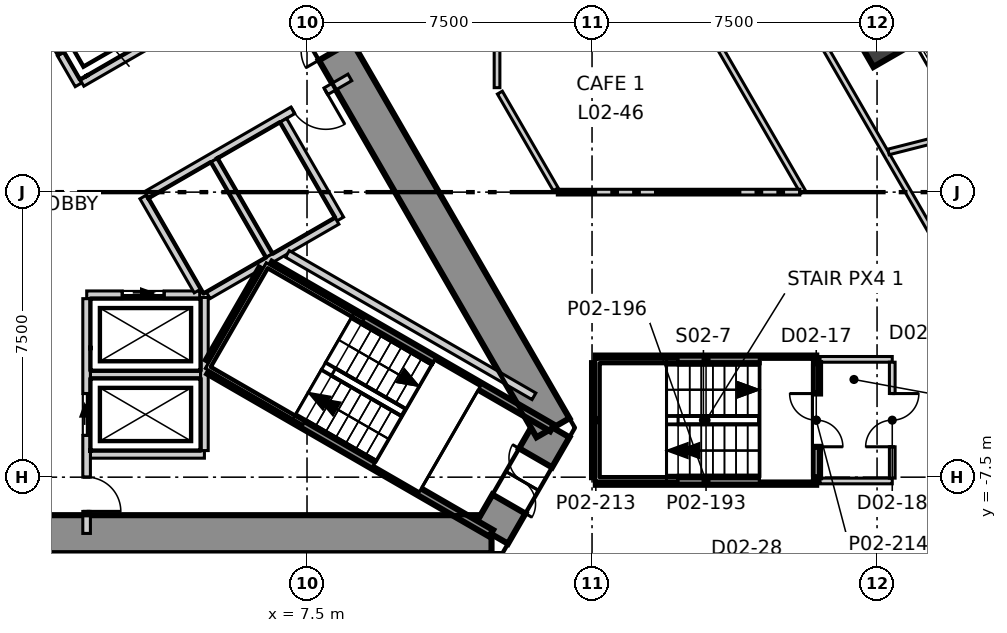
"""IFC4 building model, lengths in metres.
Left out: names, types, materials, properties, quantities, classifications, styles, units other than length and angle.
Written with IfcOpenShell. Run it as: python <this file> out.ifc"""

import sys

from ifc_helpers import new_model, si_unit, direction, frame, frame_2d, origin, origin_2d, place, context, subcontext, project, spatial, polyline, rectangle, outline, extrude, element, fill, save


model = new_model("IFC4")
c1 = context("Model", 3, precision=1e-05, world=origin(), true_north=direction((0.0, 1.0)))
c2 = subcontext(c1, "Body", "Model", "MODEL_VIEW")
j1 = project(units=[si_unit("LENGTHUNIT", "METRE"), si_unit("PLANEANGLEUNIT", "RADIAN")], contexts=[c1])
p1 = place(None, origin())
s1 = spatial("IfcSite", under=j1, at=p1, CompositionType="ELEMENT")
p2 = place(p1, origin())
s2 = spatial("IfcBuilding", under=s1, at=p2, CompositionType="ELEMENT")
p3 = place(p2, frame((0.0, 0.0, 14.5)))
s3 = spatial("IfcBuildingStorey", under=s2, at=p3, CompositionType="ELEMENT", Elevation=14.5)
p4 = place(p3, frame((-12.355, -9.0, -0.4), z_axis=(0.0, 0.0, 1.0), x_axis=(1.0, 0.0, 0.0)))
e1 = element("IfcWall", 1, at=p4, inside=s3, PredefinedType="SHEAR", context=c2, shape_type="SweptSolid", body=[
    extrude(outline(polyline([(-0.289, -0.5), (1.656, -0.5), (3.601, -0.5), (5.547, -0.5), (7.492, -0.5), (9.437, -0.5), (11.382, -0.5), (13.328, -0.5), (15.273, -0.5), (17.218, -0.5), (19.163, -0.5), (21.109, -0.5), (23.054, -0.5), (24.999, -0.5), (24.422, 0.5), (22.566, 0.5), (20.709, 0.5), (18.853, 0.5), (16.996, 0.5), (15.14, 0.5), (13.283, 0.5), (11.427, 0.5), (9.57, 0.5), (7.714, 0.5), (5.857, 0.5), (4.001, 0.5), (2.145, 0.5), (0.288, 0.5), (-0.289, -0.5)])), origin(), (0.0, 0.0, 1.0), 5.4),
])
p5 = place(p3, frame((12.355, -9.0, -0.4), z_axis=(0.0, 0.0, 1.0), x_axis=(0.500077567175, 0.865980615723, 0.0)))
e2 = element("IfcWall", 2, at=p5, inside=s3, PredefinedType="SHEAR", context=c2, shape_type="SweptSolid", body=[
    extrude(outline(polyline([(-0.288, -0.5), (1.617, -0.5), (3.522, -0.5), (2.945, 0.5), (1.617, 0.5), (0.289, 0.499), (-0.288, -0.5)])), origin(), (0.0, 0.0, 1.0), 5.4),
])
p6 = place(p5, frame((0.917, 0.0, 0.4)))
e3 = element("IfcOpeningElement", 3, at=p6, cuts=e2, PredefinedType="OPENING", context=c2, shape_type="SweptSolid", body=[
    extrude(rectangle(XDim=1.4, YDim=2.1, at=frame_2d((0.7, 1.05))), frame((0.0, 0.51, 0.0), z_axis=(0.0, -1.0, 0.0), x_axis=(1.0, 0.0, 0.0)), (0.0, 0.0, 1.0), 1.02),
])
p7 = place(p3, frame((13.972, -6.2, -0.4), z_axis=(0.0, 0.0, 1.0), x_axis=(-0.499992141631, 0.866029940768, 0.0)))
e4 = element("IfcWall", 4, at=p7, inside=s3, PredefinedType="SHEAR", context=c2, shape_type="SweptSolid", body=[
    extrude(outline(polyline([(-0.288, -0.5), (1.657, -0.5), (3.602, -0.5), (5.547, -0.5), (7.493, -0.5), (9.438, -0.5), (11.383, -0.5), (13.328, -0.5), (15.273, -0.5), (17.218, -0.499), (19.164, -0.499), (21.109, -0.499), (23.054, -0.499), (24.999, -0.499), (24.422, 0.5), (22.566, 0.5), (20.709, 0.5), (18.853, 0.5), (16.996, 0.5), (15.14, 0.5), (13.283, 0.5), (11.427, 0.5), (9.57, 0.5), (7.714, 0.5), (5.857, 0.5), (4.001, 0.5), (2.145, 0.5), (0.288, 0.5), (-0.288, -0.5)])), origin(), (0.0, 0.0, 1.0), 5.4),
])
p8 = place(p7, frame((11.455, 0.0, 0.4)))
e5 = element("IfcOpeningElement", 5, at=p8, cuts=e4, PredefinedType="OPENING", context=c2, shape_type="SweptSolid", body=[
    extrude(rectangle(XDim=1.8, YDim=2.1, at=frame_2d((0.9, 1.05))), frame((0.0, 0.51, 0.0), z_axis=(0.0, -1.0, 0.0), x_axis=(1.0, 0.0, 0.0)), (0.0, 0.0, 1.0), 1.02),
])
p9 = place(p3, frame((22.506, 4.219, -0.4), z_axis=(0.0, 0.0, 1.0), x_axis=(-0.5, 0.866025403784, 0.0)))
e6 = element("IfcColumn", 6, at=p9, inside=s3, PredefinedType="COLUMN", context=c2, shape_type="SweptSolid", body=[
    extrude(rectangle(XDim=1.5, YDim=1.1, at=origin_2d()), origin(), (0.0, 0.0, 1.0), 5.4),
])
for number, where, z_axis, x_axis in (
    (7, (21.0, -7.6, 0.0), (0.0, 0.0, 1.0), (1.0, 0.0, 0.0)),
    (8, (21.0, -4.4, 0.0), (0.0, 0.0, 1.0), (1.0, 0.0, 0.0)),
):
    element("IfcWall", number, at=place(p3, frame(where, z_axis=z_axis, x_axis=x_axis)), inside=s3, PredefinedType="PARTITIONING", context=c2, shape_type="SweptSolid", body=[
        extrude(rectangle(XDim=1.9, YDim=0.15, at=frame_2d((0.95, 0.0))), origin(), (0.0, 0.0, 1.0), 5.0),
    ])
p10 = place(p3, frame((22.9, -7.525, 0.0), z_axis=(0.0, 0.0, 1.0), x_axis=(0.0, 1.0, 0.0)))
e9 = element("IfcWall", 9, at=p10, inside=s3, PredefinedType="PARTITIONING", context=c2, shape_type="SweptSolid", body=[
    extrude(rectangle(XDim=3.05, YDim=0.15, at=frame_2d((1.525, 0.0))), origin(), (0.0, 0.0, 1.0), 5.0),
])
p11 = place(p10, frame((0.825, 0.0, 0.0)))
e10 = element("IfcOpeningElement", 10, at=p11, cuts=e9, PredefinedType="OPENING", context=c2, shape_type="SweptSolid", body=[
    extrude(rectangle(XDim=1.4, YDim=2.1, at=frame_2d((0.7, 1.05))), frame((0.0, 0.085, 0.0), z_axis=(0.0, -1.0, 0.0), x_axis=(1.0, 0.0, 0.0)), (0.0, 0.0, 1.0), 0.17),
])
p12 = place(p3, frame((16.166, 12.4, 0.0), z_axis=(0.0, 0.0, 1.0), x_axis=(0.499977560568, -0.866038358809, 0.0)))
e11 = element("IfcWall", 11, at=p12, inside=s3, PredefinedType="PARTITIONING", context=c2, shape_type="SweptSolid", body=[
    extrude(rectangle(XDim=16.541, YDim=0.15, at=frame_2d((8.271, 0.0))), origin(), (0.0, 0.0, 1.0), 5.0),
])
p13 = place(p12, frame((7.261, 0.0, 0.0)))
e12 = element("IfcOpeningElement", 12, at=p13, cuts=e11, PredefinedType="OPENING", context=c2, shape_type="SweptSolid", body=[
    extrude(rectangle(XDim=1.0, YDim=2.1, at=frame_2d((0.5, 1.05))), frame((0.0, 0.085, 0.0), z_axis=(0.0, -1.0, 0.0), x_axis=(1.0, 0.0, 0.0)), (0.0, 0.0, 1.0), 0.17),
])
p14 = place(p3, frame((22.801, 1.057, 0.0), z_axis=(0.0, 0.0, 1.0), x_axis=(0.969152417799, 0.246462149375, 0.0)))
e13 = element("IfcWall", 13, at=p14, inside=s3, PredefinedType="PARTITIONING", context=c2, shape_type="SweptSolid", body=[
    extrude(rectangle(XDim=2.208, YDim=0.15, at=frame_2d((1.104, 0.0))), origin(), (0.0, 0.0, 1.0), 5.0),
])
p15 = place(p3, frame((14.78, 10.0, 0.0), z_axis=(0.0, 0.0, 1.0), x_axis=(0.500027479704, -0.866009537788, 0.0)))
e14 = element("IfcWall", 14, at=p15, inside=s3, PredefinedType="PARTITIONING", context=c2, shape_type="SweptSolid", body=[
    extrude(rectangle(XDim=11.547, YDim=0.15, at=frame_2d((5.773, 0.0))), origin(), (0.0, 0.0, 1.0), 5.0),
])
p16 = place(p15, frame((4.874, 0.0, 0.0)))
e15 = element("IfcOpeningElement", 15, at=p16, cuts=e14, PredefinedType="OPENING", context=c2, shape_type="SweptSolid", body=[
    extrude(rectangle(XDim=1.8, YDim=2.1, at=frame_2d((0.9, 1.05))), frame((0.0, 0.085, 0.0), z_axis=(0.0, -1.0, 0.0), x_axis=(1.0, 0.0, 0.0)), (0.0, 0.0, 1.0), 0.17),
])
p17 = place(p3, frame((12.5, 2.749, 0.0), z_axis=(0.0, 0.0, 1.0), x_axis=(0.0, 1.0, 0.0)))
e16 = element("IfcWall", 16, at=p17, inside=s3, PredefinedType="PARTITIONING", context=c2, shape_type="SweptSolid", body=[
    extrude(rectangle(XDim=7.251, YDim=0.15, at=frame_2d((3.625, 0.0))), origin(), (0.0, 0.0, 1.0), 5.0),
])
p18 = place(p3, frame((14.087, 0.0, 0.0), z_axis=(0.0, 0.0, 1.0), x_axis=(1.0, 0.0, 0.0)))
e17 = element("IfcWall", 17, at=p18, inside=s3, PredefinedType="PARTITIONING", context=c2, shape_type="SweptSolid", body=[
    extrude(rectangle(XDim=6.38, YDim=0.15, at=frame_2d((3.19, 0.0))), origin(), (0.0, 0.0, 1.0), 5.0),
])
p19 = place(p3, frame((12.575, 2.619, 0.0), z_axis=(0.0, 0.0, 1.0), x_axis=(0.500062965414, -0.865989047634, 0.0)))
e18 = element("IfcWall", 18, at=p19, inside=s3, PredefinedType="PARTITIONING", context=c2, shape_type="SweptSolid", body=[
    extrude(rectangle(XDim=2.938, YDim=0.15, at=frame_2d((1.469, 0.0))), origin(), (0.0, 0.0, 1.0), 5.0),
])
p20 = place(p3, frame((1.8, -4.8, 0.0), z_axis=(0.0, 0.0, 1.0), x_axis=(1.0, 0.0, 0.0)))
e19 = element("IfcWall", 19, at=p20, inside=s3, PredefinedType="SOLIDWALL", context=c2, shape_type="SweptSolid", body=[
    extrude(rectangle(XDim=2.9, YDim=0.2, at=frame_2d((1.45, 0.0))), origin(), (0.0, 0.0, 1.0), 5.0),
])
p21 = place(p3, frame((1.8, -6.9, 0.0), z_axis=(0.0, 0.0, 1.0), x_axis=(1.0, 0.0, 0.0)))
e20 = element("IfcWall", 20, at=p21, inside=s3, PredefinedType="SOLIDWALL", context=c2, shape_type="SweptSolid", body=[
    extrude(rectangle(XDim=3.0, YDim=0.2, at=frame_2d((1.5, 0.0))), origin(), (0.0, 0.0, 1.0), 5.0),
])
p22 = place(p3, frame((1.703, -2.7, 0.0), z_axis=(0.0, 0.0, 1.0), x_axis=(1.0, 0.0, 0.0)))
e21 = element("IfcWall", 21, at=p22, inside=s3, PredefinedType="SOLIDWALL", context=c2, shape_type="SweptSolid", body=[
    extrude(rectangle(XDim=2.973, YDim=0.2, at=frame_2d((1.487, 0.0))), origin(), (0.0, 0.0, 1.0), 5.0),
])
p23 = place(p22, frame((0.936, 0.0, 0.0)))
e22 = element("IfcOpeningElement", 22, at=p23, cuts=e21, PredefinedType="OPENING", context=c2, shape_type="SweptSolid", body=[
    extrude(rectangle(XDim=1.1, YDim=2.1, at=frame_2d((0.55, 1.05))), frame((0.0, 0.11, 0.0), z_axis=(0.0, -1.0, 0.0), x_axis=(1.0, 0.0, 0.0)), (0.0, 0.0, 1.0), 0.22),
])
p24 = place(p3, frame((0.0, 5.4, 0.0), z_axis=(0.0, 0.0, 1.0), x_axis=(0.500103862429, -0.865965430478, 0.0)))
e23 = element("IfcWall", 23, at=p24, inside=s3, PredefinedType="SOLIDWALL", context=c2, shape_type="SweptSolid", body=[
    extrude(rectangle(XDim=2.973, YDim=0.2, at=frame_2d((1.487, 0.0))), origin(), (0.0, 0.0, 1.0), 5.0),
])
p25 = place(p24, frame((0.937, 0.0, 0.0)))
e24 = element("IfcOpeningElement", 24, at=p25, cuts=e23, PredefinedType="OPENING", context=c2, shape_type="SweptSolid", body=[
    extrude(rectangle(XDim=1.1, YDim=2.1, at=frame_2d((0.55, 1.05))), frame((0.0, 0.11, 0.0), z_axis=(0.0, -1.0, 0.0), x_axis=(1.0, 0.0, 0.0)), (0.0, 0.0, 1.0), 0.22),
])
p26 = place(p3, frame((3.19, -0.125, 0.0), z_axis=(0.0, 0.0, 1.0), x_axis=(0.499988658015, -0.866031951983, 0.0)))
e25 = element("IfcWall", 25, at=p26, inside=s3, PredefinedType="SOLIDWALL", context=c2, shape_type="SweptSolid", body=[
    extrude(rectangle(XDim=2.858, YDim=0.2, at=frame_2d((1.429, 0.0))), origin(), (0.0, 0.0, 1.0), 5.0),
])
p27 = place(p3, frame((1.578, 2.874, 0.0), z_axis=(0.0, 0.0, 1.0), x_axis=(0.866055259465, 0.499948284879, 0.0)))
e26 = element("IfcWall", 26, at=p27, inside=s3, PredefinedType="SOLIDWALL", context=c2, shape_type="SweptSolid", body=[
    extrude(rectangle(XDim=6.177, YDim=0.2, at=frame_2d((3.088, 0.0))), origin(), (0.0, 0.0, 1.0), 5.0),
])
p28 = place(p27, frame((2.496, 0.0, 0.0)))
e27 = element("IfcOpeningElement", 27, at=p28, cuts=e26, PredefinedType="OPENING", context=c2, shape_type="SweptSolid", body=[
    extrude(rectangle(XDim=1.1, YDim=2.1, at=frame_2d((0.55, 1.05))), frame((0.0, 0.11, 0.0), z_axis=(0.0, -1.0, 0.0), x_axis=(1.0, 0.0, 0.0)), (0.0, 0.0, 1.0), 0.22),
])
p29 = place(p27, frame((4.696, 0.0, 0.0)))
e28 = element("IfcOpeningElement", 28, at=p29, cuts=e26, PredefinedType="OPENING", context=c2, shape_type="SweptSolid", body=[
    extrude(rectangle(XDim=0.9, YDim=2.1, at=frame_2d((0.45, 1.05))), frame((0.0, 0.11, 0.0), z_axis=(0.0, -1.0, 0.0), x_axis=(1.0, 0.0, 0.0)), (0.0, 0.0, 1.0), 0.22),
])
p30 = place(p3, frame((1.7, -8.98, 0.0), z_axis=(0.0, 0.0, 1.0), x_axis=(0.0, 1.0, 0.0)))
e29 = element("IfcWall", 29, at=p30, inside=s3, PredefinedType="SOLIDWALL", context=c2, shape_type="SweptSolid", body=[
    extrude(rectangle(XDim=6.177, YDim=0.2, at=frame_2d((3.088, 0.0))), origin(), (0.0, 0.0, 1.0), 5.0),
])
p31 = place(p30, frame((2.58, 0.0, 0.0)))
e30 = element("IfcOpeningElement", 30, at=p31, cuts=e29, PredefinedType="OPENING", context=c2, shape_type="SweptSolid", body=[
    extrude(rectangle(XDim=1.1, YDim=2.1, at=frame_2d((0.55, 1.05))), frame((0.0, 0.11, 0.0), z_axis=(0.0, -1.0, 0.0), x_axis=(1.0, 0.0, 0.0)), (0.0, 0.0, 1.0), 0.22),
])
p32 = place(p30, frame((0.58, 0.0, 0.0)))
e31 = element("IfcOpeningElement", 31, at=p32, cuts=e29, PredefinedType="OPENING", context=c2, shape_type="SweptSolid", body=[
    extrude(rectangle(XDim=0.9, YDim=2.1, at=frame_2d((0.45, 1.05))), frame((0.0, 0.11, 0.0), z_axis=(0.0, -1.0, 0.0), x_axis=(1.0, 0.0, 0.0)), (0.0, 0.0, 1.0), 0.22),
])
p33 = place(p3, frame((4.8, -6.8, 0.0), z_axis=(0.0, 0.0, 1.0), x_axis=(0.0, 1.0, 0.0)))
e32 = element("IfcWall", 32, at=p33, inside=s3, PredefinedType="SOLIDWALL", context=c2, shape_type="SweptSolid", body=[
    extrude(rectangle(XDim=4.029, YDim=0.2, at=frame_2d((2.015, 0.0))), origin(), (0.0, 0.0, 1.0), 5.0),
])
p34 = place(p3, frame((3.278, -0.071, 0.0), z_axis=(0.0, 0.0, 1.0), x_axis=(0.865959795517, 0.500113619639, 0.0)))
e33 = element("IfcWall", 33, at=p34, inside=s3, PredefinedType="SOLIDWALL", context=c2, shape_type="SweptSolid", body=[
    extrude(rectangle(XDim=6.177, YDim=0.2, at=frame_2d((3.088, 0.0))), origin(), (0.0, 0.0, 1.0), 5.0),
])
p35 = place(p34, frame((4.447, 0.0, 0.0)))
e34 = element("IfcOpeningElement", 34, at=p35, cuts=e33, PredefinedType="OPENING", context=c2, shape_type="SweptSolid", body=[
    extrude(rectangle(XDim=1.0, YDim=2.1, at=frame_2d((0.5, 1.05))), frame((0.0, 0.11, 0.0), z_axis=(0.0, -1.0, 0.0), x_axis=(1.0, 0.0, 0.0)), (0.0, 0.0, 1.0), 0.22),
])
p36 = place(p3, frame((6.876, 1.891, 0.0), z_axis=(0.0, 0.0, 1.0), x_axis=(0.499990139034, -0.866031096941, 0.0)))
e35 = element("IfcWall", 35, at=p36, inside=s3, PredefinedType="SOLIDWALL", context=c2, shape_type="SweptSolid", body=[
    extrude(rectangle(XDim=3.0, YDim=0.2, at=frame_2d((1.5, 0.0))), origin(), (0.0, 0.0, 1.0), 5.0),
])
p37 = place(p3, frame((5.057, 0.841, 0.0), z_axis=(0.0, 0.0, 1.0), x_axis=(0.50012328804, -0.865954211699, 0.0)))
e36 = element("IfcWall", 36, at=p37, inside=s3, PredefinedType="SOLIDWALL", context=c2, shape_type="SweptSolid", body=[
    extrude(rectangle(XDim=2.9, YDim=0.2, at=frame_2d((1.45, 0.0))), origin(), (0.0, 0.0, 1.0), 5.0),
])
p38 = place(p3, frame((4.9, -2.714, 0.0), z_axis=(0.0, 0.0, 1.0), x_axis=(0.865992350556, 0.500057245502, 0.0)))
e37 = element("IfcWall", 37, at=p38, inside=s3, PredefinedType="SOLIDWALL", context=c2, shape_type="SweptSolid", body=[
    extrude(rectangle(XDim=3.914, YDim=0.2, at=frame_2d((1.957, 0.0))), origin(), (0.0, 0.0, 1.0), 5.0),
])
p39 = place(p3, frame((6.983, -1.626, 0.0), z_axis=(0.0, 0.0, 1.0), x_axis=(0.866012469592, -0.50002240201, 0.0)))
e38 = element("IfcWall", 38, at=p39, inside=s3, PredefinedType="SOLIDWALL", context=c2, shape_type="SweptSolid", body=[
    extrude(rectangle(XDim=7.492, YDim=0.2, at=frame_2d((3.746, 0.0))), origin(), (0.0, 0.0, 1.0), 5.0),
])
p40 = place(p3, frame((4.929, -4.693, 0.0), z_axis=(0.0, 0.0, 1.0), x_axis=(0.865987152174, -0.50006624788, 0.0)))
e39 = element("IfcWall", 39, at=p40, inside=s3, PredefinedType="SOLIDWALL", context=c2, shape_type="SweptSolid", body=[
    extrude(rectangle(XDim=8.565, YDim=0.2, at=frame_2d((4.282, 0.0))), origin(), (0.0, 0.0, 1.0), 5.0),
])
p41 = place(p3, frame((4.929, -4.462, 0.0), z_axis=(0.0, 0.0, 1.0), x_axis=(0.500200581029, 0.865909567298, 0.0)))
e40 = element("IfcWall", 40, at=p41, inside=s3, PredefinedType="SOLIDWALL", context=c2, shape_type="SweptSolid", body=[
    extrude(rectangle(XDim=2.799, YDim=0.2, at=frame_2d((1.399, 0.0))), origin(), (0.0, 0.0, 1.0), 5.0),
])
p42 = place(p3, frame((6.529, -1.922, 0.0), z_axis=(0.0, 0.0, 1.0), x_axis=(0.866036527536, -0.499980732602, 0.0)))
e41 = element("IfcWall", 41, at=p42, inside=s3, PredefinedType="SOLIDWALL", context=c2, shape_type="SweptSolid", body=[
    extrude(rectangle(XDim=8.564, YDim=0.2, at=frame_2d((4.282, 0.0))), origin(), (0.0, 0.0, 1.0), 5.0),
])
p43 = place(p3, frame((15.1, -4.4, 0.0), z_axis=(0.0, 0.0, 1.0), x_axis=(1.0, 0.0, 0.0)))
e42 = element("IfcWall", 42, at=p43, inside=s3, PredefinedType="SOLIDWALL", context=c2, shape_type="SweptSolid", body=[
    extrude(rectangle(XDim=5.8, YDim=0.2, at=frame_2d((2.9, 0.0))), origin(), (0.0, 0.0, 1.0), 5.0),
])
p44 = place(p3, frame((15.1, -7.6, 0.0), z_axis=(0.0, 0.0, 1.0), x_axis=(1.0, 0.0, 0.0)))
e43 = element("IfcWall", 43, at=p44, inside=s3, PredefinedType="SOLIDWALL", context=c2, shape_type="SweptSolid", body=[
    extrude(rectangle(XDim=5.798, YDim=0.2, at=frame_2d((2.899, 0.0))), origin(), (0.0, 0.0, 1.0), 5.0),
])
p45 = place(p3, frame((15.1, -7.5, 0.0), z_axis=(0.0, 0.0, 1.0), x_axis=(0.0, 1.0, 0.0)))
e44 = element("IfcWall", 44, at=p45, inside=s3, PredefinedType="SOLIDWALL", context=c2, shape_type="SweptSolid", body=[
    extrude(rectangle(XDim=3.0, YDim=0.2, at=frame_2d((1.5, 0.0))), origin(), (0.0, 0.0, 1.0), 5.0),
])
p46 = place(p3, frame((20.9, -7.5, 0.0), z_axis=(0.0, 0.0, 1.0), x_axis=(0.0, 1.0, 0.0)))
e45 = element("IfcWall", 45, at=p46, inside=s3, PredefinedType="SOLIDWALL", context=c2, shape_type="SweptSolid", body=[
    extrude(rectangle(XDim=3.0, YDim=0.2, at=frame_2d((1.5, 0.0))), origin(), (0.0, 0.0, 1.0), 5.0),
])
p47 = place(p46, frame((0.8, 0.0, 0.0)))
e46 = element("IfcOpeningElement", 46, at=p47, cuts=e45, PredefinedType="OPENING", context=c2, shape_type="SweptSolid", body=[
    extrude(rectangle(XDim=1.4, YDim=2.1, at=frame_2d((0.7, 1.05))), frame((0.0, 0.11, 0.0), z_axis=(0.0, -1.0, 0.0), x_axis=(1.0, 0.0, 0.0)), (0.0, 0.0, 1.0), 0.22),
])
p48 = place(p23, origin())
e47 = element("IfcDoor", 47, at=p48, inside=s3, OperationType="SLIDING_TO_LEFT", PredefinedType="DOOR", context=c2, shape_type="SweptSolid", body=[
    extrude(rectangle(XDim=1.1, YDim=2.1, at=frame_2d((0.55, 1.05))), frame((0.0, 0.025, 0.0), z_axis=(0.0, -1.0, 0.0), x_axis=(1.0, 0.0, 0.0)), (0.0, 0.0, 1.0), 0.05),
])
fill(e22, e47)
p49 = place(p31, origin())
e48 = element("IfcDoor", 48, at=p49, inside=s3, OperationType="SLIDING_TO_LEFT", PredefinedType="DOOR", context=c2, shape_type="SweptSolid", body=[
    extrude(rectangle(XDim=1.1, YDim=2.1, at=frame_2d((0.55, 1.05))), frame((0.0, 0.025, 0.0), z_axis=(0.0, -1.0, 0.0), x_axis=(1.0, 0.0, 0.0)), (0.0, 0.0, 1.0), 0.05),
])
fill(e30, e48)
p50 = place(p25, origin())
e49 = element("IfcDoor", 49, at=p50, inside=s3, OperationType="SLIDING_TO_LEFT", PredefinedType="DOOR", context=c2, shape_type="SweptSolid", body=[
    extrude(rectangle(XDim=1.1, YDim=2.1, at=frame_2d((0.55, 1.05))), frame((0.0, 0.025, 0.0), z_axis=(0.0, -1.0, 0.0), x_axis=(1.0, 0.0, 0.0)), (0.0, 0.0, 1.0), 0.05),
])
fill(e24, e49)
p51 = place(p47, origin())
e50 = element("IfcDoor", 50, at=p51, inside=s3, OperationType="DOUBLE_DOOR_SINGLE_SWING", PredefinedType="DOOR", context=c2, shape_type="SweptSolid", body=[
    extrude(rectangle(XDim=1.4, YDim=2.1, at=frame_2d((0.7, 1.05))), frame((0.0, 0.025, 0.0), z_axis=(0.0, -1.0, 0.0), x_axis=(1.0, 0.0, 0.0)), (0.0, 0.0, 1.0), 0.05),
])
fill(e46, e50)
p52 = place(p11, origin())
e51 = element("IfcDoor", 51, at=p52, inside=s3, OperationType="DOUBLE_DOOR_SINGLE_SWING", PredefinedType="DOOR", context=c2, shape_type="SweptSolid", body=[
    extrude(rectangle(XDim=1.4, YDim=2.1, at=frame_2d((0.7, 1.05))), frame((0.0, 0.025, 0.0), z_axis=(0.0, -1.0, 0.0), x_axis=(1.0, 0.0, 0.0)), (0.0, 0.0, 1.0), 0.05),
])
fill(e10, e51)
p53 = place(p6, origin())
e52 = element("IfcDoor", 52, at=p53, inside=s3, OperationType="DOUBLE_DOOR_SINGLE_SWING", PredefinedType="DOOR", context=c2, shape_type="SweptSolid", body=[
    extrude(rectangle(XDim=1.4, YDim=2.1, at=frame_2d((0.7, 1.05))), frame((0.0, 0.025, 0.0), z_axis=(0.0, -1.0, 0.0), x_axis=(1.0, 0.0, 0.0)), (0.0, 0.0, 1.0), 0.05),
])
fill(e3, e52)
p54 = place(p32, origin())
e53 = element("IfcDoor", 53, at=p54, inside=s3, OperationType="SINGLE_SWING_LEFT", PredefinedType="DOOR", context=c2, shape_type="SweptSolid", body=[
    extrude(rectangle(XDim=0.9, YDim=2.1, at=frame_2d((0.45, 1.05))), frame((0.0, 0.025, 0.0), z_axis=(0.0, -1.0, 0.0), x_axis=(1.0, 0.0, 0.0)), (0.0, 0.0, 1.0), 0.05),
])
fill(e31, e53)
p55 = place(p35, origin())
e54 = element("IfcDoor", 54, at=p55, inside=s3, OperationType="SINGLE_SWING_RIGHT", PredefinedType="DOOR", context=c2, shape_type="SweptSolid", body=[
    extrude(rectangle(XDim=1.0, YDim=2.1, at=frame_2d((0.5, 1.05))), frame((0.0, 0.025, 0.0), z_axis=(0.0, -1.0, 0.0), x_axis=(1.0, 0.0, 0.0)), (0.0, 0.0, 1.0), 0.05),
])
fill(e34, e54)
save(model, sys.argv[1])
